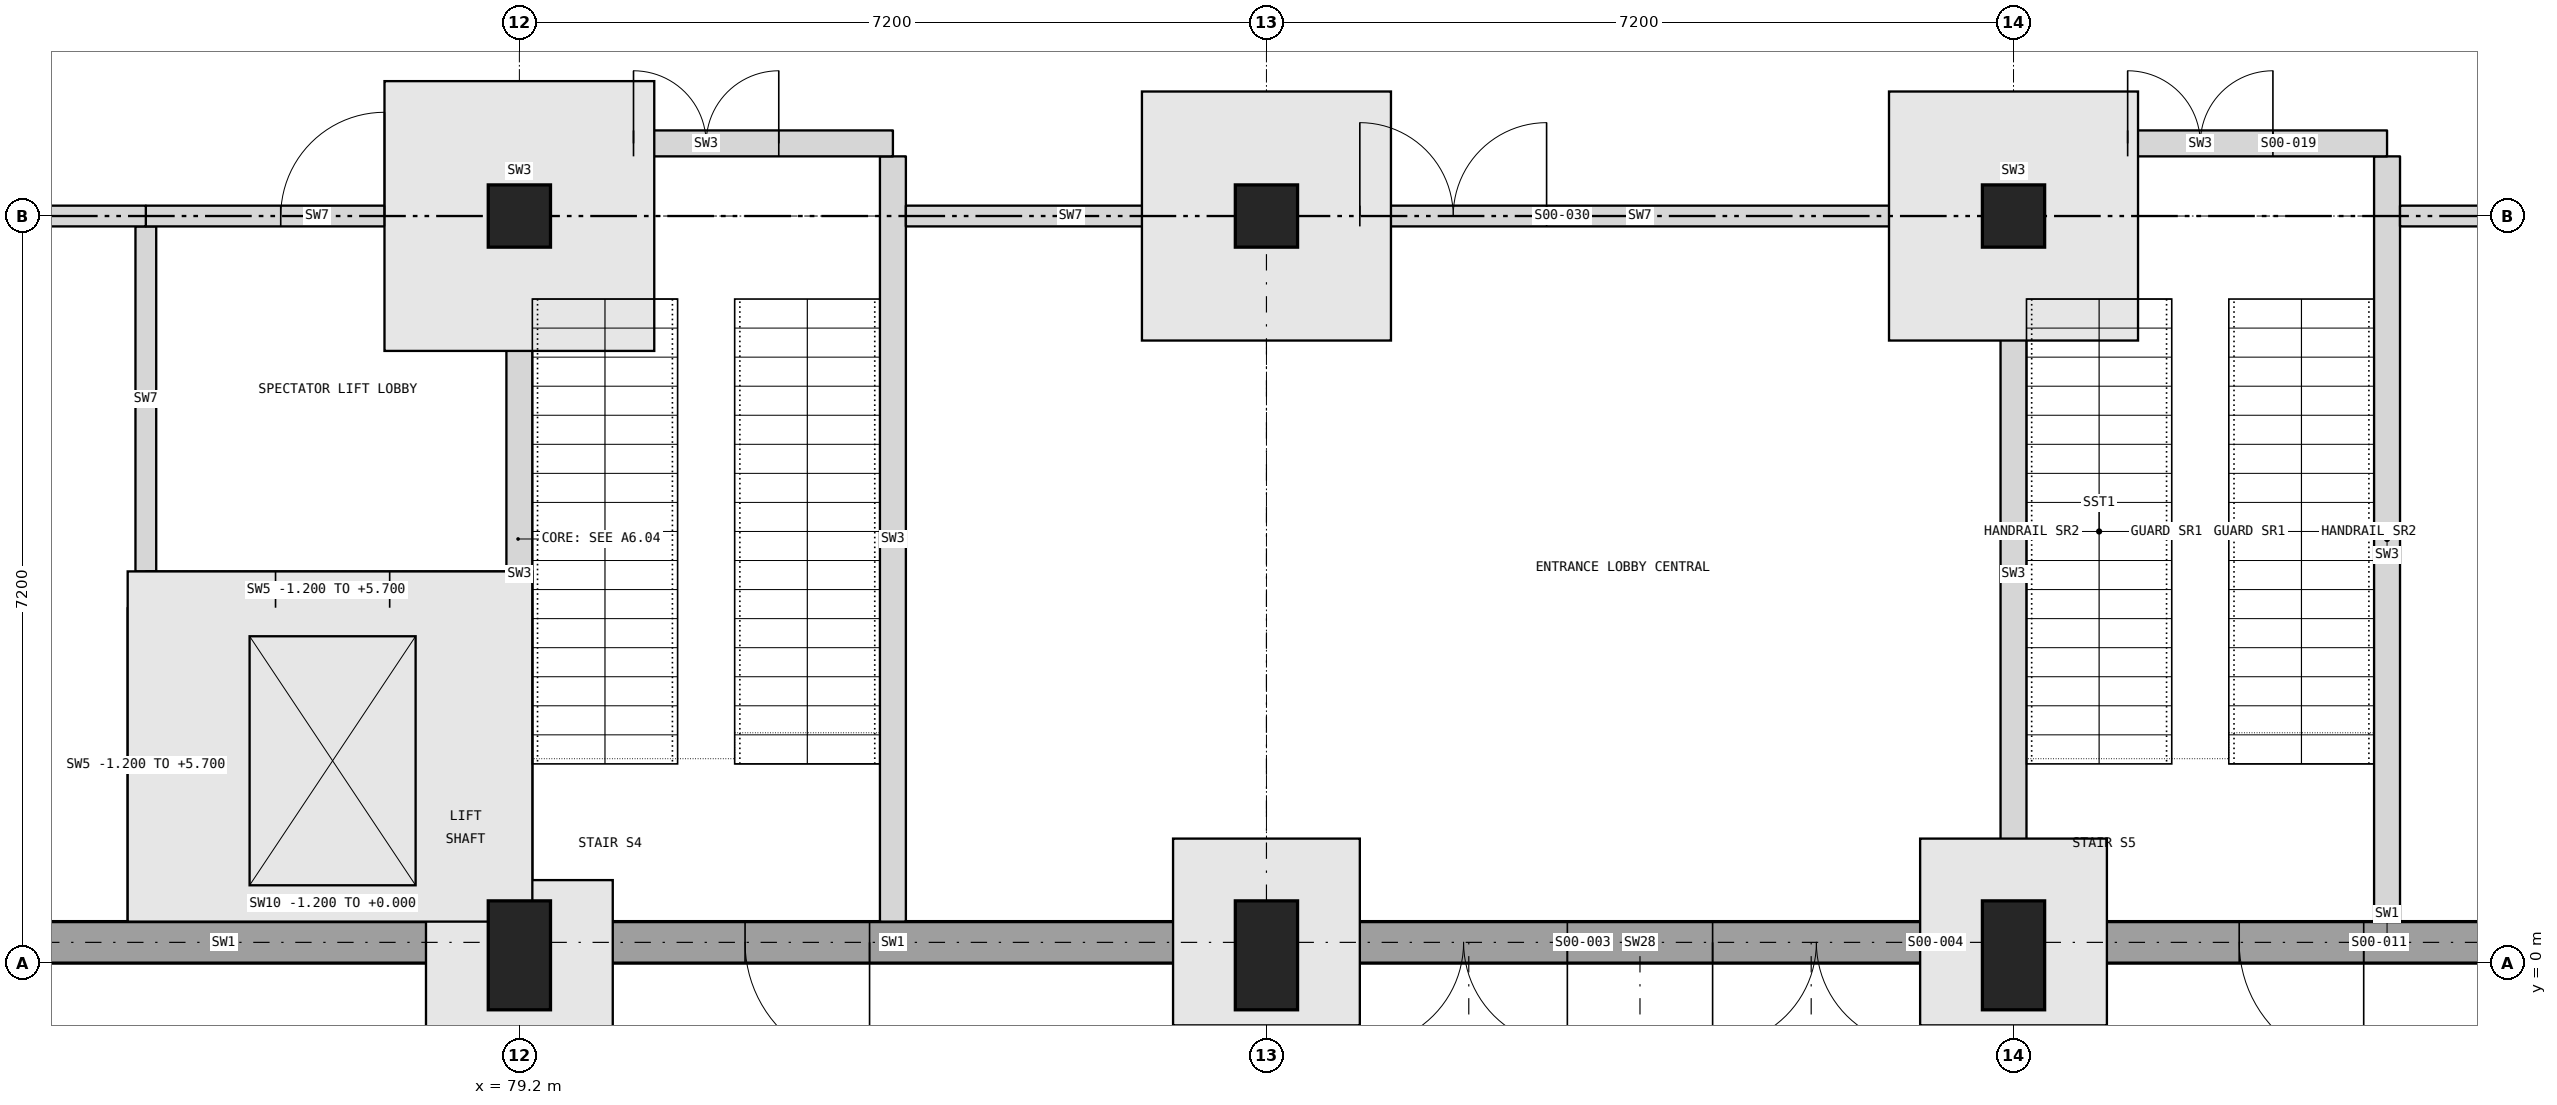
"""IFC4 building model, lengths in metres.
Left out: names, types, materials, properties, quantities, classifications, styles, units other than length and angle.
Written with IfcOpenShell. Run it as: python <this file> out.ifc"""

import sys

from ifc_helpers import new_model, si_unit, direction, frame, frame_2d, origin, origin_2d, place, context, subcontext, project, spatial, rectangle, extrude, element, fill, save


model = new_model("IFC4")
c1 = context("Model", 3, precision=1e-05, world=origin(), true_north=direction((0.0, 1.0)))
c2 = subcontext(c1, "Body", "Model", "MODEL_VIEW")
j1 = project(units=[si_unit("LENGTHUNIT", "METRE"), si_unit("PLANEANGLEUNIT", "RADIAN")], contexts=[c1])
p1 = place(None, origin())
s1 = spatial("IfcSite", under=j1, at=p1, CompositionType="ELEMENT")
p2 = place(p1, origin())
s2 = spatial("IfcBuilding", under=s1, at=p2, CompositionType="ELEMENT")
p3 = place(p2, origin())
s3 = spatial("IfcBuildingStorey", under=s2, at=p3, CompositionType="ELEMENT", Elevation=0.0)
p4 = place(p3, frame((79.2, 0.075, -0.45), z_axis=(0.0, 0.0, 1.0), x_axis=(1.0, 0.0, 0.0)))
e1 = element("IfcColumn", 1, at=p4, inside=s3, PredefinedType="COLUMN", context=c2, shape_type="SweptSolid", body=[
    extrude(rectangle(XDim=0.6, YDim=1.05, at=origin_2d()), origin(), (0.0, 0.0, 1.0), 6.45),
])
p5 = place(p3, frame((79.2, 7.2, -0.405), z_axis=(0.0, 0.0, 1.0), x_axis=(1.0, 0.0, 0.0)))
e2 = element("IfcColumn", 2, at=p5, inside=s3, PredefinedType="COLUMN", context=c2, shape_type="SweptSolid", body=[
    extrude(rectangle(XDim=0.6, YDim=0.6, at=origin_2d()), origin(), (0.0, 0.0, 1.0), 6.405),
])
p6 = place(p3, frame((86.4, 0.075, -0.45), z_axis=(0.0, 0.0, 1.0), x_axis=(1.0, 0.0, 0.0)))
e3 = element("IfcColumn", 3, at=p6, inside=s3, PredefinedType="COLUMN", context=c2, shape_type="SweptSolid", body=[
    extrude(rectangle(XDim=0.6, YDim=1.05, at=origin_2d()), origin(), (0.0, 0.0, 1.0), 6.45),
])
p7 = place(p3, frame((86.4, 7.2, -0.405), z_axis=(0.0, 0.0, 1.0), x_axis=(1.0, 0.0, 0.0)))
e4 = element("IfcColumn", 4, at=p7, inside=s3, PredefinedType="COLUMN", context=c2, shape_type="SweptSolid", body=[
    extrude(rectangle(XDim=0.6, YDim=0.6, at=origin_2d()), origin(), (0.0, 0.0, 1.0), 6.405),
])
p8 = place(p3, frame((93.6, 0.075, -0.45), z_axis=(0.0, 0.0, 1.0), x_axis=(1.0, 0.0, 0.0)))
e5 = element("IfcColumn", 5, at=p8, inside=s3, PredefinedType="COLUMN", context=c2, shape_type="SweptSolid", body=[
    extrude(rectangle(XDim=0.6, YDim=1.05, at=origin_2d()), origin(), (0.0, 0.0, 1.0), 6.45),
])
p9 = place(p3, frame((93.6, 7.2, -0.405), z_axis=(0.0, 0.0, 1.0), x_axis=(1.0, 0.0, 0.0)))
e6 = element("IfcColumn", 6, at=p9, inside=s3, PredefinedType="COLUMN", context=c2, shape_type="SweptSolid", body=[
    extrude(rectangle(XDim=0.6, YDim=0.6, at=origin_2d()), origin(), (0.0, 0.0, 1.0), 6.405),
])
p10 = place(p3, frame((73.8, 0.2, 0.0), z_axis=(0.0, 0.0, 1.0), x_axis=(1.0, 0.0, 0.0)))
e7 = element("IfcWall", 7, at=p10, inside=s3, PredefinedType="SOLIDWALL", context=c2, shape_type="SweptSolid", body=[
    extrude(rectangle(XDim=5.1, YDim=0.4, at=frame_2d((2.55, 0.0))), origin(), (0.0, 0.0, 1.0), 5.1),
])
p11 = place(p3, frame((79.5, 0.2, 0.0), z_axis=(0.0, 0.0, 1.0), x_axis=(1.0, 0.0, 0.0)))
e8 = element("IfcWall", 8, at=p11, inside=s3, PredefinedType="SOLIDWALL", context=c2, shape_type="SweptSolid", body=[
    extrude(rectangle(XDim=6.6, YDim=0.4, at=frame_2d((3.3, 0.0))), origin(), (0.0, 0.0, 1.0), 5.1),
])
p12 = place(p11, frame((1.875, 0.0, 0.0)))
e9 = element("IfcOpeningElement", 9, at=p12, cuts=e8, PredefinedType="OPENING", context=c2, shape_type="SweptSolid", body=[
    extrude(rectangle(XDim=1.2, YDim=2.1, at=frame_2d((0.6, 1.05))), frame((0.0, 0.21, 0.0), z_axis=(0.0, -1.0, 0.0), x_axis=(1.0, 0.0, 0.0)), (0.0, 0.0, 1.0), 0.42),
])
p13 = place(p3, frame((86.7, 0.2, 0.0), z_axis=(0.0, 0.0, 1.0), x_axis=(1.0, 0.0, 0.0)))
e10 = element("IfcWall", 10, at=p13, inside=s3, PredefinedType="SOLIDWALL", context=c2, shape_type="SweptSolid", body=[
    extrude(rectangle(XDim=6.6, YDim=0.4, at=frame_2d((3.3, 0.0))), origin(), (0.0, 0.0, 1.0), 5.7),
])
p14 = place(p13, frame((0.6, 0.0, 0.0)))
e11 = element("IfcOpeningElement", 11, at=p14, cuts=e10, PredefinedType="OPENING", context=c2, shape_type="SweptSolid", body=[
    extrude(rectangle(XDim=2.0, YDim=2.4, at=frame_2d((1.0, 1.2))), frame((0.0, 0.21, 0.0), z_axis=(0.0, -1.0, 0.0), x_axis=(1.0, 0.0, 0.0)), (0.0, 0.0, 1.0), 0.42),
])
p15 = place(p13, frame((4.0, 0.0, 0.0)))
e12 = element("IfcOpeningElement", 12, at=p15, cuts=e10, PredefinedType="OPENING", context=c2, shape_type="SweptSolid", body=[
    extrude(rectangle(XDim=2.0, YDim=2.4, at=frame_2d((1.0, 1.2))), frame((0.0, 0.21, 0.0), z_axis=(0.0, -1.0, 0.0), x_axis=(1.0, 0.0, 0.0)), (0.0, 0.0, 1.0), 0.42),
])
p16 = place(p3, frame((93.9, 0.2, 0.0), z_axis=(0.0, 0.0, 1.0), x_axis=(1.0, 0.0, 0.0)))
e13 = element("IfcWall", 13, at=p16, inside=s3, PredefinedType="SOLIDWALL", context=c2, shape_type="SweptSolid", body=[
    extrude(rectangle(XDim=6.6, YDim=0.4, at=frame_2d((3.3, 0.0))), origin(), (0.0, 0.0, 1.0), 5.1),
])
p17 = place(p16, frame((1.875, 0.0, 0.0)))
e14 = element("IfcOpeningElement", 14, at=p17, cuts=e13, PredefinedType="OPENING", context=c2, shape_type="SweptSolid", body=[
    extrude(rectangle(XDim=1.2, YDim=2.1, at=frame_2d((0.6, 1.05))), frame((0.0, 0.21, 0.0), z_axis=(0.0, -1.0, 0.0), x_axis=(1.0, 0.0, 0.0)), (0.0, 0.0, 1.0), 0.42),
])
p18 = place(p3, frame((75.775, 0.575, -1.2), z_axis=(0.0, 0.0, 1.0), x_axis=(1.0, 0.0, 0.0)))
e15 = element("IfcWall", 15, at=p18, inside=s3, PredefinedType="SOLIDWALL", context=c2, shape_type="SweptSolid", body=[
    extrude(rectangle(XDim=3.25, YDim=0.35, at=frame_2d((1.625, 0.0))), origin(), (0.0, 0.0, 1.0), 1.2),
])
p19 = place(p3, frame((75.6, 0.4, -1.2), z_axis=(0.0, 0.0, 1.0), x_axis=(0.0, 1.0, 0.0)))
e16 = element("IfcWall", 16, at=p19, inside=s3, PredefinedType="SOLIDWALL", context=c2, shape_type="SweptSolid", body=[
    extrude(rectangle(XDim=3.025, YDim=0.35, at=frame_2d((1.513, 0.0))), origin(), (0.0, 0.0, 1.0), 6.9),
])
p20 = place(p3, frame((75.6, 3.775, 0.0), z_axis=(0.0, 0.0, 1.0), x_axis=(0.0, 1.0, 0.0)))
e17 = element("IfcWall", 17, at=p20, inside=s3, PredefinedType="PARTITIONING", context=c2, shape_type="SweptSolid", body=[
    extrude(rectangle(XDim=3.325, YDim=0.2, at=frame_2d((1.663, 0.0))), origin(), (0.0, 0.0, 1.0), 5.7),
])
p21 = place(p3, frame((79.2, 0.6, 0.0), z_axis=(0.0, 0.0, 1.0), x_axis=(0.0, 1.0, 0.0)))
e18 = element("IfcWall", 18, at=p21, inside=s3, PredefinedType="SOLIDWALL", context=c2, shape_type="SweptSolid", body=[
    extrude(rectangle(XDim=6.3, YDim=0.25, at=frame_2d((3.15, 0.0))), origin(), (0.0, 0.0, 1.0), 5.7),
])
p22 = place(p3, frame((79.2, 7.5, 0.0), z_axis=(0.0, 0.0, 1.0), x_axis=(0.0, 1.0, 0.0)))
e19 = element("IfcWall", 19, at=p22, inside=s3, PredefinedType="SOLIDWALL", context=c2, shape_type="SweptSolid", body=[
    extrude(rectangle(XDim=0.275, YDim=0.25, at=frame_2d((0.137, 0.0))), origin(), (0.0, 0.0, 1.0), 5.7),
])
p23 = place(p3, frame((82.8, 0.4, 0.0), z_axis=(0.0, 0.0, 1.0), x_axis=(0.0, 1.0, 0.0)))
e20 = element("IfcWall", 20, at=p23, inside=s3, PredefinedType="SOLIDWALL", context=c2, shape_type="SweptSolid", body=[
    extrude(rectangle(XDim=7.375, YDim=0.25, at=frame_2d((3.688, 0.0))), origin(), (0.0, 0.0, 1.0), 5.7),
])
p24 = place(p3, frame((93.6, 0.6, 0.0), z_axis=(0.0, 0.0, 1.0), x_axis=(0.0, 1.0, 0.0)))
e21 = element("IfcWall", 21, at=p24, inside=s3, PredefinedType="SOLIDWALL", context=c2, shape_type="SweptSolid", body=[
    extrude(rectangle(XDim=6.3, YDim=0.25, at=frame_2d((3.15, 0.0))), origin(), (0.0, 0.0, 1.0), 5.7),
])
p25 = place(p3, frame((93.6, 7.5, 0.0), z_axis=(0.0, 0.0, 1.0), x_axis=(0.0, 1.0, 0.0)))
e22 = element("IfcWall", 22, at=p25, inside=s3, PredefinedType="SOLIDWALL", context=c2, shape_type="SweptSolid", body=[
    extrude(rectangle(XDim=0.275, YDim=0.25, at=frame_2d((0.137, 0.0))), origin(), (0.0, 0.0, 1.0), 5.7),
])
p26 = place(p3, frame((97.2, 0.4, 0.0), z_axis=(0.0, 0.0, 1.0), x_axis=(0.0, 1.0, 0.0)))
e23 = element("IfcWall", 23, at=p26, inside=s3, PredefinedType="SOLIDWALL", context=c2, shape_type="SweptSolid", body=[
    extrude(rectangle(XDim=7.375, YDim=0.25, at=frame_2d((3.688, 0.0))), origin(), (0.0, 0.0, 1.0), 5.7),
])
p27 = place(p3, frame((75.6, 3.6, -1.2), z_axis=(0.0, 0.0, 1.0), x_axis=(1.0, 0.0, 0.0)))
e24 = element("IfcWall", 24, at=p27, inside=s3, PredefinedType="SOLIDWALL", context=c2, shape_type="SweptSolid", body=[
    extrude(rectangle(XDim=3.475, YDim=0.35, at=frame_2d((1.737, 0.0))), origin(), (0.0, 0.0, 1.0), 6.9),
])
p28 = place(p27, frame((1.25, 0.0, 1.2)))
e25 = element("IfcOpeningElement", 25, at=p28, cuts=e24, PredefinedType="OPENING", context=c2, shape_type="SweptSolid", body=[
    extrude(rectangle(XDim=1.1, YDim=2.1, at=frame_2d((0.55, 1.05))), frame((0.0, 0.185, 0.0), z_axis=(0.0, -1.0, 0.0), x_axis=(1.0, 0.0, 0.0)), (0.0, 0.0, 1.0), 0.37),
])
p29 = place(p3, frame((75.6, 7.2, 0.0), z_axis=(0.0, 0.0, 1.0), x_axis=(1.0, 0.0, 0.0)))
e26 = element("IfcWall", 26, at=p29, inside=s3, PredefinedType="PARTITIONING", context=c2, shape_type="SweptSolid", body=[
    extrude(rectangle(XDim=3.3, YDim=0.2, at=frame_2d((1.65, 0.0))), origin(), (0.0, 0.0, 1.0), 5.7),
])
p30 = place(p29, frame((1.3, 0.0, 0.0)))
e27 = element("IfcOpeningElement", 27, at=p30, cuts=e26, PredefinedType="OPENING", context=c2, shape_type="SweptSolid", body=[
    extrude(rectangle(XDim=1.0, YDim=2.1, at=frame_2d((0.5, 1.05))), frame((0.0, 0.11, 0.0), z_axis=(0.0, -1.0, 0.0), x_axis=(1.0, 0.0, 0.0)), (0.0, 0.0, 1.0), 0.22),
])
p31 = place(p3, frame((82.925, 7.2, 0.0), z_axis=(0.0, 0.0, 1.0), x_axis=(1.0, 0.0, 0.0)))
e28 = element("IfcWall", 28, at=p31, inside=s3, PredefinedType="PARTITIONING", context=c2, shape_type="SweptSolid", body=[
    extrude(rectangle(XDim=3.175, YDim=0.2, at=frame_2d((1.587, 0.0))), origin(), (0.0, 0.0, 1.0), 5.7),
])
p32 = place(p3, frame((86.7, 7.2, 0.0), z_axis=(0.0, 0.0, 1.0), x_axis=(1.0, 0.0, 0.0)))
e29 = element("IfcWall", 29, at=p32, inside=s3, PredefinedType="PARTITIONING", context=c2, shape_type="SweptSolid", body=[
    extrude(rectangle(XDim=6.6, YDim=0.2, at=frame_2d((3.3, 0.0))), origin(), (0.0, 0.0, 1.0), 5.7),
])
p33 = place(p32, frame((0.6, 0.0, 0.0)))
e30 = element("IfcOpeningElement", 30, at=p33, cuts=e29, PredefinedType="OPENING", context=c2, shape_type="SweptSolid", body=[
    extrude(rectangle(XDim=1.8, YDim=2.1, at=frame_2d((0.9, 1.05))), frame((0.0, 0.11, 0.0), z_axis=(0.0, -1.0, 0.0), x_axis=(1.0, 0.0, 0.0)), (0.0, 0.0, 1.0), 0.22),
])
p34 = place(p3, frame((97.325, 7.2, 0.0), z_axis=(0.0, 0.0, 1.0), x_axis=(1.0, 0.0, 0.0)))
e31 = element("IfcWall", 31, at=p34, inside=s3, PredefinedType="PARTITIONING", context=c2, shape_type="SweptSolid", body=[
    extrude(rectangle(XDim=3.175, YDim=0.2, at=frame_2d((1.587, 0.0))), origin(), (0.0, 0.0, 1.0), 5.7),
])
p35 = place(p3, frame((72.3, 7.2, 0.0), z_axis=(0.0, 0.0, 1.0), x_axis=(1.0, 0.0, 0.0)))
e32 = element("IfcWall", 32, at=p35, inside=s3, PredefinedType="PARTITIONING", context=c2, shape_type="SweptSolid", body=[
    extrude(rectangle(XDim=3.3, YDim=0.2, at=frame_2d((1.65, 0.0))), origin(), (0.0, 0.0, 1.0), 5.7),
])
p36 = place(p35, frame((0.2, 0.0, 0.0)))
e33 = element("IfcOpeningElement", 33, at=p36, cuts=e32, PredefinedType="OPENING", context=c2, shape_type="SweptSolid", body=[
    extrude(rectangle(XDim=1.0, YDim=2.1, at=frame_2d((0.5, 1.05))), frame((0.0, 0.11, 0.0), z_axis=(0.0, -1.0, 0.0), x_axis=(1.0, 0.0, 0.0)), (0.0, 0.0, 1.0), 0.22),
])
p37 = place(p3, frame((79.2, 7.9, 0.0), z_axis=(0.0, 0.0, 1.0), x_axis=(1.0, 0.0, 0.0)))
e34 = element("IfcWall", 34, at=p37, inside=s3, PredefinedType="SOLIDWALL", context=c2, shape_type="SweptSolid", body=[
    extrude(rectangle(XDim=3.6, YDim=0.25, at=frame_2d((1.8, 0.0))), origin(), (0.0, 0.0, 1.0), 5.7),
])
p38 = place(p37, frame((1.1, 0.0, 0.0)))
e35 = element("IfcOpeningElement", 35, at=p38, cuts=e34, PredefinedType="OPENING", context=c2, shape_type="SweptSolid", body=[
    extrude(rectangle(XDim=1.4, YDim=2.1, at=frame_2d((0.7, 1.05))), frame((0.0, 0.135, 0.0), z_axis=(0.0, -1.0, 0.0), x_axis=(1.0, 0.0, 0.0)), (0.0, 0.0, 1.0), 0.27),
])
p39 = place(p3, frame((93.6, 7.9, 0.0), z_axis=(0.0, 0.0, 1.0), x_axis=(1.0, 0.0, 0.0)))
e36 = element("IfcWall", 36, at=p39, inside=s3, PredefinedType="SOLIDWALL", context=c2, shape_type="SweptSolid", body=[
    extrude(rectangle(XDim=3.6, YDim=0.25, at=frame_2d((1.8, 0.0))), origin(), (0.0, 0.0, 1.0), 5.7),
])
p40 = place(p39, frame((1.1, 0.0, 0.0)))
e37 = element("IfcOpeningElement", 37, at=p40, cuts=e36, PredefinedType="OPENING", context=c2, shape_type="SweptSolid", body=[
    extrude(rectangle(XDim=1.4, YDim=2.1, at=frame_2d((0.7, 1.05))), frame((0.0, 0.135, 0.0), z_axis=(0.0, -1.0, 0.0), x_axis=(1.0, 0.0, 0.0)), (0.0, 0.0, 1.0), 0.27),
])
p41 = place(p14, frame((2.0, 0.0, 0.0), z_axis=(0.0, 0.0, 1.0), x_axis=(-1.0, 0.0, 0.0)))
e38 = element("IfcDoor", 38, at=p41, inside=s3, OperationType="DOUBLE_DOOR_SINGLE_SWING", PredefinedType="DOOR", context=c2, shape_type="SweptSolid", body=[
    extrude(rectangle(XDim=2.0, YDim=2.4, at=frame_2d((1.0, 1.2))), frame((0.0, 0.025, 0.0), z_axis=(0.0, -1.0, 0.0), x_axis=(1.0, 0.0, 0.0)), (0.0, 0.0, 1.0), 0.05),
])
fill(e11, e38)
p42 = place(p15, frame((2.0, 0.0, 0.0), z_axis=(0.0, 0.0, 1.0), x_axis=(-1.0, 0.0, 0.0)))
e39 = element("IfcDoor", 39, at=p42, inside=s3, OperationType="DOUBLE_DOOR_SINGLE_SWING", PredefinedType="DOOR", context=c2, shape_type="SweptSolid", body=[
    extrude(rectangle(XDim=2.0, YDim=2.4, at=frame_2d((1.0, 1.2))), frame((0.0, 0.025, 0.0), z_axis=(0.0, -1.0, 0.0), x_axis=(1.0, 0.0, 0.0)), (0.0, 0.0, 1.0), 0.05),
])
fill(e12, e39)
p43 = place(p12, frame((1.2, 0.0, 0.0), z_axis=(0.0, 0.0, 1.0), x_axis=(-1.0, 0.0, 0.0)))
e40 = element("IfcDoor", 40, at=p43, inside=s3, OperationType="SINGLE_SWING_LEFT", PredefinedType="DOOR", context=c2, shape_type="SweptSolid", body=[
    extrude(rectangle(XDim=1.2, YDim=2.1, at=frame_2d((0.6, 1.05))), frame((0.0, 0.025, 0.0), z_axis=(0.0, -1.0, 0.0), x_axis=(1.0, 0.0, 0.0)), (0.0, 0.0, 1.0), 0.05),
])
fill(e9, e40)
p44 = place(p17, frame((1.2, 0.0, 0.0), z_axis=(0.0, 0.0, 1.0), x_axis=(-1.0, 0.0, 0.0)))
e41 = element("IfcDoor", 41, at=p44, inside=s3, OperationType="SINGLE_SWING_LEFT", PredefinedType="DOOR", context=c2, shape_type="SweptSolid", body=[
    extrude(rectangle(XDim=1.2, YDim=2.1, at=frame_2d((0.6, 1.05))), frame((0.0, 0.025, 0.0), z_axis=(0.0, -1.0, 0.0), x_axis=(1.0, 0.0, 0.0)), (0.0, 0.0, 1.0), 0.05),
])
fill(e14, e41)
p45 = place(p38, origin())
e42 = element("IfcDoor", 42, at=p45, inside=s3, OperationType="DOUBLE_DOOR_SINGLE_SWING", PredefinedType="DOOR", context=c2, shape_type="SweptSolid", body=[
    extrude(rectangle(XDim=1.4, YDim=2.1, at=frame_2d((0.7, 1.05))), frame((0.0, 0.025, 0.0), z_axis=(0.0, -1.0, 0.0), x_axis=(1.0, 0.0, 0.0)), (0.0, 0.0, 1.0), 0.05),
])
fill(e35, e42)
p46 = place(p40, origin())
e43 = element("IfcDoor", 43, at=p46, inside=s3, OperationType="DOUBLE_DOOR_SINGLE_SWING", PredefinedType="DOOR", context=c2, shape_type="SweptSolid", body=[
    extrude(rectangle(XDim=1.4, YDim=2.1, at=frame_2d((0.7, 1.05))), frame((0.0, 0.025, 0.0), z_axis=(0.0, -1.0, 0.0), x_axis=(1.0, 0.0, 0.0)), (0.0, 0.0, 1.0), 0.05),
])
fill(e37, e43)
p47 = place(p33, origin())
e44 = element("IfcDoor", 44, at=p47, inside=s3, OperationType="DOUBLE_DOOR_SINGLE_SWING", PredefinedType="DOOR", context=c2, shape_type="SweptSolid", body=[
    extrude(rectangle(XDim=1.8, YDim=2.1, at=frame_2d((0.9, 1.05))), frame((0.0, 0.025, 0.0), z_axis=(0.0, -1.0, 0.0), x_axis=(1.0, 0.0, 0.0)), (0.0, 0.0, 1.0), 0.05),
])
fill(e30, e44)
p48 = place(p30, origin())
e45 = element("IfcDoor", 45, at=p48, inside=s3, OperationType="SINGLE_SWING_RIGHT", PredefinedType="DOOR", context=c2, shape_type="SweptSolid", body=[
    extrude(rectangle(XDim=1.0, YDim=2.1, at=frame_2d((0.5, 1.05))), frame((0.0, 0.025, 0.0), z_axis=(0.0, -1.0, 0.0), x_axis=(1.0, 0.0, 0.0)), (0.0, 0.0, 1.0), 0.05),
])
fill(e27, e45)
p49 = place(p28, origin())
e46 = element("IfcDoor", 46, at=p49, inside=s3, OperationType="DOUBLE_DOOR_SLIDING", PredefinedType="DOOR", context=c2, shape_type="SweptSolid", body=[
    extrude(rectangle(XDim=1.1, YDim=2.1, at=frame_2d((0.55, 1.05))), frame((0.0, 0.025, 0.0), z_axis=(0.0, -1.0, 0.0), x_axis=(1.0, 0.0, 0.0)), (0.0, 0.0, 1.0), 0.05),
])
fill(e25, e46)
save(model, sys.argv[1])
